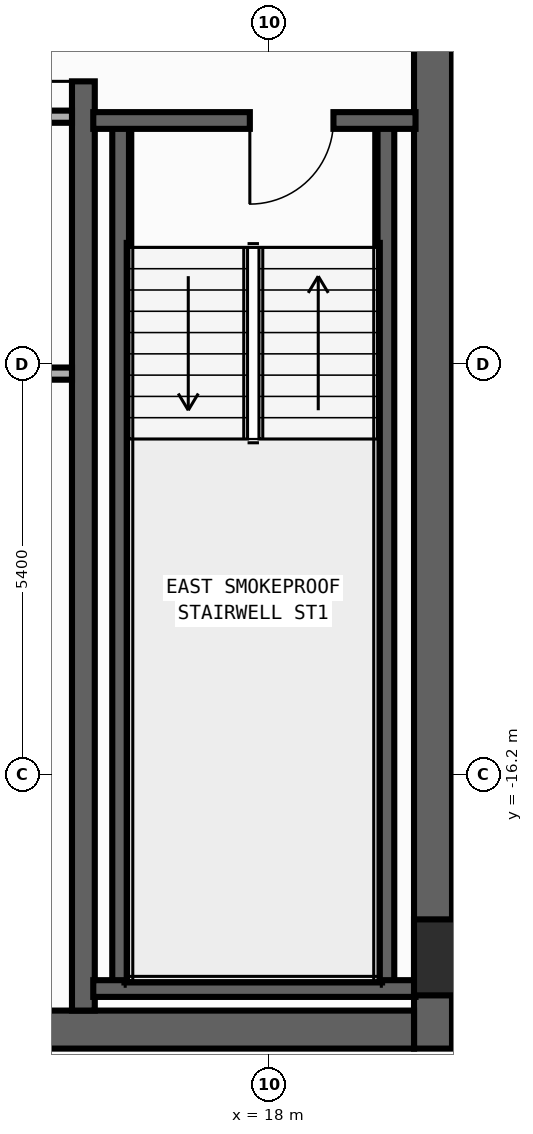
"""IFC4 building model, lengths in metres.
Left out: names, types, materials, properties, quantities, classifications, styles, units other than length and angle.
Written with IfcOpenShell. Run it as: python <this file> out.ifc"""

import sys

from ifc_helpers import new_model, si_unit, direction, frame, frame_2d, origin, origin_2d, place, context, subcontext, project, spatial, rectangle, circle, extrude, element, fill, save


model = new_model("IFC4")
c1 = context("Model", 3, precision=1e-05, world=origin(), true_north=direction((0.0, 1.0)))
c2 = subcontext(c1, "Body", "Model", "MODEL_VIEW")
j1 = project(units=[si_unit("LENGTHUNIT", "METRE"), si_unit("PLANEANGLEUNIT", "RADIAN")], contexts=[c1])
p1 = place(None, origin())
s1 = spatial("IfcSite", under=j1, at=p1, CompositionType="ELEMENT")
p2 = place(p1, origin())
s2 = spatial("IfcBuilding", under=s1, at=p2, CompositionType="ELEMENT")
p3 = place(p2, frame((0.0, 0.0, 300.4)))
s3 = spatial("IfcBuildingStorey", under=s2, at=p3, CompositionType="ELEMENT", Elevation=300.4)
p4 = place(p3, frame((20.15, -19.8, 0.0), z_axis=(0.0, 0.0, 1.0), x_axis=(0.0, 1.0, 0.0)))
e1 = element("IfcWall", 1, at=p4, inside=s3, PredefinedType="SHEAR", context=c2, shape_type="SweptSolid", body=[
    extrude(rectangle(XDim=27.0, YDim=0.5, at=frame_2d((13.5, 0.0))), origin(), (0.0, 0.0, 1.0), 3.54),
])
p5 = place(p3, frame((12.5, -19.55, 0.0), z_axis=(0.0, 0.0, 1.0), x_axis=(1.0, 0.0, 0.0)))
e2 = element("IfcWall", 2, at=p5, inside=s3, PredefinedType="SHEAR", context=c2, shape_type="SweptSolid", body=[
    extrude(rectangle(XDim=7.4, YDim=0.5, at=frame_2d((3.7, 0.0))), origin(), (0.0, 0.0, 1.0), 3.54),
])
p6 = place(p3, frame((15.55, -19.3, 0.0), z_axis=(0.0, 0.0, 1.0), x_axis=(0.0, 1.0, 0.0)))
e3 = element("IfcWall", 3, at=p6, inside=s3, PredefinedType="SHEAR", context=c2, shape_type="SweptSolid", body=[
    extrude(rectangle(XDim=26.0, YDim=0.3, at=frame_2d((13.0, 0.0))), origin(), (0.0, 0.0, 1.0), 3.54),
])
p7 = place(p6, frame((12.225, 0.0, 0.0)))
e4 = element("IfcOpeningElement", 4, at=p7, cuts=e3, PredefinedType="OPENING", context=c2, shape_type="SweptSolid", body=[
    extrude(rectangle(XDim=1.15, YDim=2.2, at=frame_2d((0.575, 1.1))), frame((0.0, 0.16, 0.0), z_axis=(0.0, -1.0, 0.0), x_axis=(1.0, 0.0, 0.0)), (0.0, 0.0, 1.0), 0.32),
])
p8 = place(p6, frame((24.625, 0.0, 0.0)))
e5 = element("IfcOpeningElement", 5, at=p8, cuts=e3, PredefinedType="OPENING", context=c2, shape_type="SweptSolid", body=[
    extrude(rectangle(XDim=0.85, YDim=2.1, at=frame_2d((0.425, 1.05))), frame((0.0, 0.16, 0.0), z_axis=(0.0, -1.0, 0.0), x_axis=(1.0, 0.0, 0.0)), (0.0, 0.0, 1.0), 0.32),
])
for number, where, z_axis, x_axis in (
    (6, (16.04, -19.01, 0.0), (0.0, 0.0, 1.0), (0.0, 1.0, 0.0)),
    (7, (19.53, -19.01, 0.0), (0.0, 0.0, 1.0), (0.0, 1.0, 0.0)),
):
    element("IfcWall", number, at=place(p3, frame(where, z_axis=z_axis, x_axis=x_axis)), inside=s3, PredefinedType="SHEAR", context=c2, shape_type="SweptSolid", body=[
        extrude(rectangle(XDim=11.42, YDim=0.22, at=frame_2d((5.71, 0.0))), origin(), (0.0, 0.0, 1.0), 3.54),
    ])
p9 = place(p3, frame((15.68, -19.01, 0.0), z_axis=(0.0, 0.0, 1.0), x_axis=(1.0, 0.0, 0.0)))
e8 = element("IfcWall", 8, at=p9, inside=s3, PredefinedType="SHEAR", context=c2, shape_type="SweptSolid", body=[
    extrude(rectangle(XDim=4.24, YDim=0.22, at=frame_2d((2.12, 0.0))), origin(), (0.0, 0.0, 1.0), 3.54),
])
p10 = place(p3, frame((19.92, -7.59, 0.0), z_axis=(0.0, 0.0, 1.0), x_axis=(-1.0, 0.0, 0.0)))
e9 = element("IfcWall", 9, at=p10, inside=s3, PredefinedType="SHEAR", context=c2, shape_type="SweptSolid", body=[
    extrude(rectangle(XDim=4.24, YDim=0.22, at=frame_2d((2.12, 0.0))), origin(), (0.0, 0.0, 1.0), 3.54),
])
p11 = place(p10, frame((1.08, 0.0, 0.0)))
e10 = element("IfcOpeningElement", 10, at=p11, cuts=e9, PredefinedType="OPENING", context=c2, shape_type="SweptSolid", body=[
    extrude(rectangle(XDim=1.1, YDim=2.2, at=frame_2d((0.55, 1.1))), frame((0.0, 0.12, 0.0), z_axis=(0.0, -1.0, 0.0), x_axis=(1.0, 0.0, 0.0)), (0.0, 0.0, 1.0), 0.24),
])
p12 = place(p3, frame((20.4, -18.6, 0.0), z_axis=(0.0, 0.0, 1.0), x_axis=(1.0, 0.0, 0.0)))
e11 = element("IfcColumn", 11, at=p12, inside=s3, PredefinedType="COLUMN", context=c2, shape_type="SweptSolid", body=[
    extrude(circle(Radius=0.5, at=origin_2d()), origin(), (0.0, 0.0, 1.0), 3.8),
])
p13 = place(p3, frame((12.8, -7.54, 0.0), z_axis=(0.0, 0.0, 1.0), x_axis=(1.0, 0.0, 0.0)))
e12 = element("IfcWall", 12, at=p13, inside=s3, PredefinedType="STANDARD", context=c2, shape_type="SweptSolid", body=[
    extrude(rectangle(XDim=2.6, YDim=0.16, at=frame_2d((1.3, 0.0))), origin(), (0.0, 0.0, 1.0), 3.54),
])
p14 = place(p3, frame((12.5, -10.92, 0.0), z_axis=(0.0, 0.0, 1.0), x_axis=(1.0, 0.0, 0.0)))
e13 = element("IfcWall", 13, at=p14, inside=s3, PredefinedType="PARTITIONING", context=c2, shape_type="SweptSolid", body=[
    extrude(rectangle(XDim=2.9, YDim=0.16, at=frame_2d((1.45, 0.0))), origin(), (0.0, 0.0, 1.0), 2.64),
])
p15 = place(p11, origin())
e14 = element("IfcDoor", 14, at=p15, inside=s3, OperationType="SINGLE_SWING_RIGHT", PredefinedType="DOOR", context=c2, shape_type="SweptSolid", body=[
    extrude(rectangle(XDim=1.1, YDim=2.2, at=frame_2d((0.55, 1.1))), frame((0.0, 0.025, 0.0), z_axis=(0.0, -1.0, 0.0), x_axis=(1.0, 0.0, 0.0)), (0.0, 0.0, 1.0), 0.05),
])
fill(e10, e14)
p16 = place(p7, origin())
e15 = element("IfcDoor", 15, at=p16, inside=s3, OperationType="SINGLE_SWING_LEFT", PredefinedType="DOOR", context=c2, shape_type="SweptSolid", body=[
    extrude(rectangle(XDim=1.15, YDim=2.2, at=frame_2d((0.575, 1.1))), frame((0.0, 0.025, 0.0), z_axis=(0.0, -1.0, 0.0), x_axis=(1.0, 0.0, 0.0)), (0.0, 0.0, 1.0), 0.05),
])
fill(e4, e15)
save(model, sys.argv[1])
